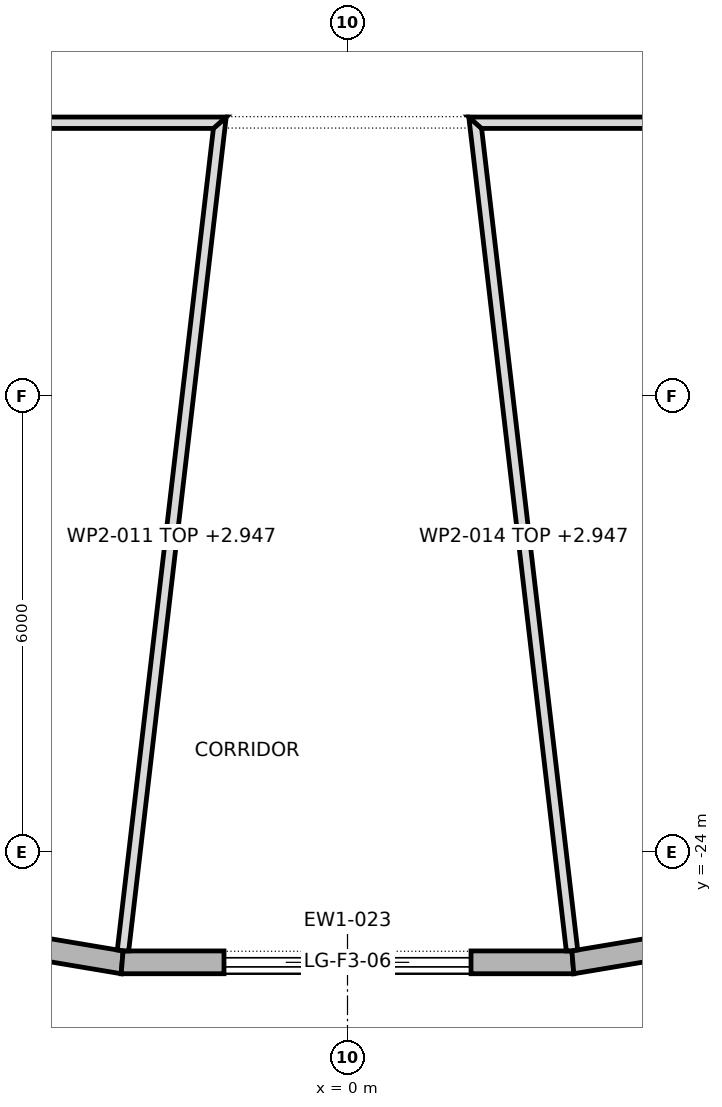
"""IFC4 building model, lengths in metres.
Left out: names, types, materials, properties, quantities, classifications, styles, units other than length and angle.
Written with IfcOpenShell. Run it as: python <this file> out.ifc"""

import sys

from ifc_helpers import new_model, si_unit, direction, frame, frame_2d, origin, place, context, subcontext, project, spatial, polyline, rectangle, outline, extrude, element, fill, save


model = new_model("IFC4")
c1 = context("Model", 3, precision=1e-05, world=origin(), true_north=direction((0.0, 1.0)))
c2 = subcontext(c1, "Body", "Model", "MODEL_VIEW")
j1 = project(units=[si_unit("LENGTHUNIT", "METRE"), si_unit("PLANEANGLEUNIT", "RADIAN")], contexts=[c1])
p1 = place(None, origin())
s1 = spatial("IfcSite", under=j1, at=p1, CompositionType="ELEMENT")
p2 = place(p1, origin())
s2 = spatial("IfcBuilding", under=s1, at=p2, CompositionType="ELEMENT")
p3 = place(p2, frame((0.0, 0.0, 178.9)))
s3 = spatial("IfcBuildingStorey", under=s2, at=p3, CompositionType="ELEMENT", Elevation=178.9)
p4 = place(p3, frame((-8.781, -24.469, 0.0), z_axis=(0.0, 0.0, 1.0), x_axis=(0.986201934369, -0.165546805001, 0.0)))
e1 = element("IfcWall", 1, at=p4, inside=s3, PredefinedType="STANDARD", context=c2, shape_type="SweptSolid", body=[
    extrude(outline(polyline([(-0.013, -0.15), (5.91, -0.15), (5.885, 0.15), (0.013, 0.15), (-0.013, -0.15)])), origin(), (0.0, 0.0, 1.0), 3.7),
])
p5 = place(p4, frame((1.324, 0.0, 0.6)))
e2 = element("IfcOpeningElement", 2, at=p5, cuts=e1, PredefinedType="OPENING", context=c2, shape_type="SweptSolid", body=[
    extrude(rectangle(XDim=3.25, YDim=2.65, at=frame_2d((1.625, 1.325))), frame((0.0, 0.162, 0.0), z_axis=(0.0, -1.0, 0.0), x_axis=(1.0, 0.0, 0.0)), (0.0, 0.0, 1.0), 0.324),
])
p6 = place(p3, frame((-2.965, -25.446, 0.0), z_axis=(0.0, 0.0, 1.0), x_axis=(1.0, 0.0, 0.0)))
e3 = element("IfcWall", 3, at=p6, inside=s3, PredefinedType="STANDARD", context=c2, shape_type="SweptSolid", body=[
    extrude(outline(polyline([(-0.012, -0.15), (5.942, -0.15), (5.917, 0.15), (0.012, 0.15), (-0.012, -0.15)])), origin(), (0.0, 0.0, 1.0), 3.7),
])
p7 = place(p6, frame((1.34, 0.0, 0.0)))
e4 = element("IfcOpeningElement", 4, at=p7, cuts=e3, PredefinedType="OPENING", context=c2, shape_type="SweptSolid", body=[
    extrude(rectangle(XDim=3.25, YDim=3.25, at=frame_2d((1.625, 1.625))), frame((0.0, 0.162, 0.0), z_axis=(0.0, -1.0, 0.0), x_axis=(1.0, 0.0, 0.0)), (0.0, 0.0, 1.0), 0.324),
])
p8 = place(p3, frame((2.965, -25.446, 0.0), z_axis=(0.0, 0.0, 1.0), x_axis=(0.986201934369, 0.165546805001, 0.0)))
e5 = element("IfcWall", 5, at=p8, inside=s3, PredefinedType="STANDARD", context=c2, shape_type="SweptSolid", body=[
    extrude(outline(polyline([(-0.012, -0.15), (5.91, -0.15), (5.885, 0.15), (0.012, 0.15), (-0.012, -0.15)])), origin(), (0.0, 0.0, 1.0), 3.7),
])
p9 = place(p8, frame((1.324, 0.0, 0.6)))
e6 = element("IfcOpeningElement", 6, at=p9, cuts=e5, PredefinedType="OPENING", context=c2, shape_type="SweptSolid", body=[
    extrude(rectangle(XDim=3.25, YDim=2.65, at=frame_2d((1.625, 1.325))), frame((0.0, 0.162, 0.0), z_axis=(0.0, -1.0, 0.0), x_axis=(1.0, 0.0, 0.0)), (0.0, 0.0, 1.0), 0.324),
])
p10 = place(p3, frame((-2.954, -25.292, 0.0), z_axis=(0.0, 0.0, 1.0), x_axis=(0.116172056535, 0.993229104125, 0.0)))
e7 = element("IfcWall", 7, at=p10, inside=s3, PredefinedType="PARTITIONING", context=c2, shape_type="SweptSolid", body=[
    extrude(outline(polyline([(11.05, -0.075), (11.05, -0.075), (10.966, 0.0), (10.882, 0.075), (9.068, 0.075), (7.254, 0.075), (5.441, 0.075), (3.627, 0.075), (1.813, 0.075), (0.0, 0.075), (0.0, -0.036), (0.005, -0.075), (1.845, -0.075), (3.686, -0.075), (5.527, -0.075), (7.368, -0.075), (9.209, -0.075), (11.05, -0.075)])), origin(), (0.0, 0.0, 1.0), 2.947),
])
p11 = place(p3, frame((-1.596, -14.4, 0.0), z_axis=(0.0, 0.0, 1.0), x_axis=(-1.0, 0.0, 0.0)))
e8 = element("IfcWall", 8, at=p11, inside=s3, PredefinedType="PARTITIONING", context=c2, shape_type="SweptSolid", body=[
    extrude(outline(polyline([(0.0, -0.075), (1.818, -0.075), (3.637, -0.075), (5.455, -0.075), (7.274, -0.075), (9.092, -0.075), (10.911, -0.075), (12.729, -0.075), (12.879, 0.075), (11.063, 0.075), (9.248, 0.075), (7.432, 0.075), (5.616, 0.075), (3.8, 0.075), (1.984, 0.075), (0.168, 0.075), (0.0, -0.075), (0.0, -0.075)])), origin(), (0.0, 0.0, 1.0), 3.7),
])
p12 = place(p3, frame((1.67, -14.316, 0.0), z_axis=(0.0, 0.0, 1.0), x_axis=(0.116172056535, -0.993229104125, 0.0)))
e9 = element("IfcWall", 9, at=p12, inside=s3, PredefinedType="PARTITIONING", context=c2, shape_type="SweptSolid", body=[
    extrude(outline(polyline([(0.0, -0.075), (1.841, -0.075), (3.682, -0.075), (5.523, -0.075), (7.364, -0.075), (9.205, -0.075), (11.045, -0.075), (11.05, -0.037), (11.05, 0.075), (9.236, 0.075), (7.423, 0.075), (5.609, 0.075), (3.795, 0.075), (1.982, 0.075), (0.168, 0.075), (0.084, 0.0), (0.0, -0.075), (0.0, -0.075)])), origin(), (0.0, 0.0, 1.0), 2.947),
])
p13 = place(p3, frame((14.475, -14.4, 0.0), z_axis=(0.0, 0.0, 1.0), x_axis=(-1.0, 0.0, 0.0)))
e10 = element("IfcWall", 10, at=p13, inside=s3, PredefinedType="PARTITIONING", context=c2, shape_type="SweptSolid", body=[
    extrude(outline(polyline([(12.879, -0.075), (12.879, -0.075), (12.711, 0.075), (10.895, 0.075), (9.079, 0.075), (7.263, 0.075), (5.448, 0.075), (3.632, 0.075), (1.816, 0.075), (0.0, 0.075), (0.15, -0.075), (1.969, -0.075), (3.787, -0.075), (5.605, -0.075), (7.424, -0.075), (9.242, -0.075), (11.061, -0.075), (12.879, -0.075)])), origin(), (0.0, 0.0, 1.0), 3.7),
])
p14 = place(p13, frame((5.535, 0.0, 0.0)))
e11 = element("IfcOpeningElement", 11, at=p14, cuts=e10, PredefinedType="OPENING", context=c2, shape_type="SweptSolid", body=[
    extrude(rectangle(XDim=1.8, YDim=2.1, at=frame_2d((0.9, 1.05))), frame((0.0, 0.087, 0.0), z_axis=(0.0, -1.0, 0.0), x_axis=(1.0, 0.0, 0.0)), (0.0, 0.0, 1.0), 0.174),
])
p15 = place(p7, origin())
e12 = element("IfcDoor", 12, at=p15, inside=s3, OperationType="DOUBLE_DOOR_SLIDING", PredefinedType="DOOR", context=c2, shape_type="SweptSolid", body=[
    extrude(rectangle(XDim=3.25, YDim=3.25, at=frame_2d((1.625, 1.625))), frame((0.0, 0.025, 0.0), z_axis=(0.0, -1.0, 0.0), x_axis=(1.0, 0.0, 0.0)), (0.0, 0.0, 1.0), 0.05),
])
fill(e4, e12)
save(model, sys.argv[1])
